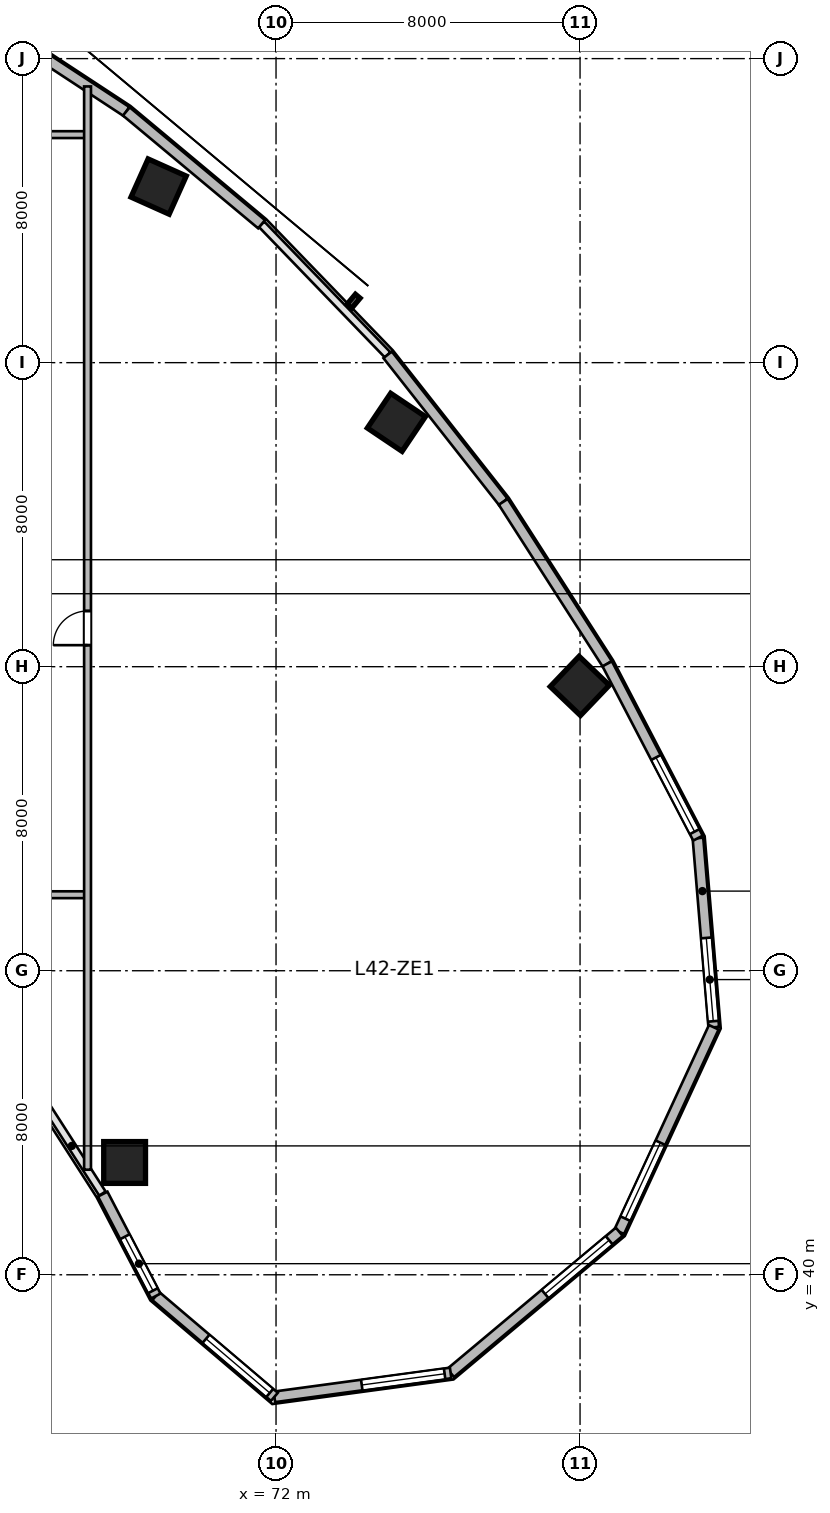
"""IFC4 building model, lengths in metres.
Left out: names, types, materials, properties, quantities, classifications, styles, units other than length and angle.
Written with IfcOpenShell. Run it as: python <this file> out.ifc"""

import sys

from ifc_helpers import new_model, si_unit, direction, frame, frame_2d, origin, origin_2d, place, context, subcontext, project, spatial, rectangle, circle, extrude, source, transform, mapped, element, fill, save


model = new_model("IFC4")
c1 = context("Model", 3, precision=1e-05, world=origin(), true_north=direction((0.0, 1.0)))
c2 = subcontext(c1, "Body", "Model", "MODEL_VIEW")
j1 = project(units=[si_unit("LENGTHUNIT", "METRE"), si_unit("PLANEANGLEUNIT", "RADIAN")], contexts=[c1])
p1 = place(None, origin())
s1 = spatial("IfcSite", under=j1, at=p1, CompositionType="ELEMENT")
p2 = place(p1, origin())
s2 = spatial("IfcBuilding", under=s1, at=p2, CompositionType="ELEMENT")
p3 = place(p2, frame((0.0, 0.0, 174.0)))
s3 = spatial("IfcBuildingStorey", under=s2, at=p3, CompositionType="ELEMENT", Elevation=174.0)
m1 = source(origin(), c2, "Body", "SweptSolid", [
    extrude(rectangle(XDim=1.1, YDim=1.1, at=origin_2d()), origin(), (0.0, 0.0, 1.0), 3.9),
])
for number, where, z_axis, x_axis in (
    (1, (68.91, 68.633, 0.0), (0.0, 0.0, 1.0), (0.409, 0.912, 0.0)),
    (2, (75.167, 62.43, 0.0), (0.0, 0.0, 1.0), (0.558, 0.83, 0.0)),
):
    element("IfcColumn", number, at=place(p3, frame(where, z_axis=z_axis, x_axis=x_axis)), inside=s3, PredefinedType="COLUMN", context=c2, shape_type="MappedRepresentation", body=[
        mapped(m1, transform((0.0, 0.0, 0.0), scale=1.0)),
    ])
m2 = source(origin(), c2, "Body", "SweptSolid", [
    extrude(circle(Radius=0.55, at=origin_2d()), origin(), (0.0, 0.0, 1.0), 3.9),
])
p4 = place(p3, frame((68.015, 42.955, 0.0), z_axis=(0.0, 0.0, 1.0), x_axis=(0.690756218984, 0.723087716626, 0.0)))
e3 = element("IfcColumn", 3, at=p4, inside=s3, PredefinedType="COLUMN", context=c2, shape_type="MappedRepresentation", body=[
    mapped(m2, transform((0.0, 0.0, 0.0), scale=1.0)),
])
p5 = place(p3, frame((79.993, 55.494, 0.0), z_axis=(0.0, 0.0, 1.0), x_axis=(0.690756218984, 0.723087716626, 0.0)))
e4 = element("IfcColumn", 4, at=p5, inside=s3, PredefinedType="COLUMN", context=c2, shape_type="MappedRepresentation", body=[
    mapped(m1, transform((0.0, 0.0, 0.0), scale=1.0)),
])
m3 = source(origin(), c2, "Body", "SweptSolid", [
    extrude(rectangle(XDim=4.994, YDim=0.28, at=frame_2d((2.497, 0.0))), origin(), (0.0, 0.0, 1.0), 3.65),
])
p6 = place(p3, frame((83.102, 51.489, 0.0), z_axis=(0.0, 0.0, 1.0), x_axis=(0.083344839916, -0.996520766296, 0.0)))
e5 = element("IfcWall", 5, at=p6, inside=s3, PredefinedType="SOLIDWALL", context=c2, shape_type="MappedRepresentation", body=[
    mapped(m3, transform((0.0, 0.0, 0.0), scale=1.0)),
])
p7 = place(p6, frame((2.635, 0.0, 0.95)))
e6 = element("IfcOpeningElement", 6, at=p7, cuts=e5, PredefinedType="OPENING", context=c2, shape_type="SweptSolid", body=[
    extrude(rectangle(XDim=2.2, YDim=2.1, at=frame_2d((1.1, 1.05))), frame((0.0, 0.15, 0.0), z_axis=(0.0, -1.0, 0.0), x_axis=(1.0, 0.0, 0.0)), (0.0, 0.0, 1.0), 0.3),
])
m4 = source(origin(), c2, "Body", "SweptSolid", [
    extrude(rectangle(XDim=5.927, YDim=0.28, at=frame_2d((2.964, 0.0))), origin(), (0.0, 0.0, 1.0), 3.65),
])
p8 = place(p3, frame((83.519, 46.512, 0.0), z_axis=(0.0, 0.0, 1.0), x_axis=(-0.419656204795, -0.907683132914, 0.0)))
e7 = element("IfcWall", 7, at=p8, inside=s3, PredefinedType="SOLIDWALL", context=c2, shape_type="MappedRepresentation", body=[
    mapped(m4, transform((0.0, 0.0, 0.0), scale=1.0)),
])
p9 = place(p8, frame((3.346, 0.0, 0.95)))
e8 = element("IfcOpeningElement", 8, at=p9, cuts=e7, PredefinedType="OPENING", context=c2, shape_type="SweptSolid", body=[
    extrude(rectangle(XDim=2.2, YDim=2.1, at=frame_2d((1.1, 1.05))), frame((0.0, 0.15, 0.0), z_axis=(0.0, -1.0, 0.0), x_axis=(1.0, 0.0, 0.0)), (0.0, 0.0, 1.0), 0.3),
])
m5 = source(origin(), c2, "Body", "SweptSolid", [
    extrude(rectangle(XDim=5.786, YDim=0.28, at=frame_2d((2.893, 0.0))), origin(), (0.0, 0.0, 1.0), 3.65),
])
p10 = place(p3, frame((81.031, 41.131, 0.0), z_axis=(0.0, 0.0, 1.0), x_axis=(-0.766711306852, -0.641992034176, 0.0)))
e9 = element("IfcWall", 9, at=p10, inside=s3, PredefinedType="SOLIDWALL", context=c2, shape_type="MappedRepresentation", body=[
    mapped(m5, transform((0.0, 0.0, 0.0), scale=1.0)),
])
p11 = place(p10, frame((0.347, 0.0, 0.95)))
e10 = element("IfcOpeningElement", 10, at=p11, cuts=e9, PredefinedType="OPENING", context=c2, shape_type="SweptSolid", body=[
    extrude(rectangle(XDim=2.2, YDim=2.1, at=frame_2d((1.1, 1.05))), frame((0.0, 0.15, 0.0), z_axis=(0.0, -1.0, 0.0), x_axis=(1.0, 0.0, 0.0)), (0.0, 0.0, 1.0), 0.3),
])
m6 = source(origin(), c2, "Body", "SweptSolid", [
    extrude(rectangle(XDim=4.68, YDim=0.28, at=frame_2d((2.34, 0.0))), origin(), (0.0, 0.0, 1.0), 3.65),
])
p12 = place(p3, frame((76.594, 37.417, 0.0), z_axis=(0.0, 0.0, 1.0), x_axis=(-0.990931146435, -0.134370618162, 0.0)))
e11 = element("IfcWall", 11, at=p12, inside=s3, PredefinedType="SOLIDWALL", context=c2, shape_type="MappedRepresentation", body=[
    mapped(m6, transform((0.0, 0.0, 0.0), scale=1.0)),
])
p13 = place(p12, frame((0.16, 0.0, 0.95)))
e12 = element("IfcOpeningElement", 12, at=p13, cuts=e11, PredefinedType="OPENING", context=c2, shape_type="SweptSolid", body=[
    extrude(rectangle(XDim=2.2, YDim=2.1, at=frame_2d((1.1, 1.05))), frame((0.0, 0.15, 0.0), z_axis=(0.0, -1.0, 0.0), x_axis=(1.0, 0.0, 0.0)), (0.0, 0.0, 1.0), 0.3),
])
m7 = source(origin(), c2, "Body", "SweptSolid", [
    extrude(rectangle(XDim=4.096, YDim=0.28, at=frame_2d((2.048, 0.0))), origin(), (0.0, 0.0, 1.0), 3.65),
])
p14 = place(p3, frame((71.957, 36.788, 0.0), z_axis=(0.0, 0.0, 1.0), x_axis=(-0.761926081737, 0.647663991564, 0.0)))
e13 = element("IfcWall", 13, at=p14, inside=s3, PredefinedType="SOLIDWALL", context=c2, shape_type="MappedRepresentation", body=[
    mapped(m7, transform((0.0, 0.0, 0.0), scale=1.0)),
])
p15 = place(p14, frame((0.16, 0.0, 0.95)))
e14 = element("IfcOpeningElement", 14, at=p15, cuts=e13, PredefinedType="OPENING", context=c2, shape_type="SweptSolid", body=[
    extrude(rectangle(XDim=2.2, YDim=2.1, at=frame_2d((1.1, 1.05))), frame((0.0, 0.15, 0.0), z_axis=(0.0, -1.0, 0.0), x_axis=(1.0, 0.0, 0.0)), (0.0, 0.0, 1.0), 0.3),
])
m8 = source(origin(), c2, "Body", "SweptSolid", [
    extrude(rectangle(XDim=3.024, YDim=0.28, at=frame_2d((1.512, 0.0))), origin(), (0.0, 0.0, 1.0), 3.65),
])
p16 = place(p3, frame((68.836, 39.44, 0.0), z_axis=(0.0, 0.0, 1.0), x_axis=(-0.461718746531, 0.887026380161, 0.0)))
e15 = element("IfcWall", 15, at=p16, inside=s3, PredefinedType="SOLIDWALL", context=c2, shape_type="MappedRepresentation", body=[
    mapped(m8, transform((0.0, 0.0, 0.0), scale=1.0)),
])
p17 = place(p16, frame((0.16, 0.0, 0.95)))
e16 = element("IfcOpeningElement", 16, at=p17, cuts=e15, PredefinedType="OPENING", context=c2, shape_type="SweptSolid", body=[
    extrude(rectangle(XDim=1.6, YDim=1.9, at=frame_2d((0.8, 0.95))), frame((0.0, 0.15, 0.0), z_axis=(0.0, -1.0, 0.0), x_axis=(1.0, 0.0, 0.0)), (0.0, 0.0, 1.0), 0.3),
])
m9 = source(origin(), c2, "Body", "SweptSolid", [
    extrude(rectangle(XDim=4.501, YDim=0.28, at=frame_2d((2.25, 0.0))), origin(), (0.0, 0.0, 1.0), 3.65),
])
p18 = place(p3, frame((64.298, 73.08, 0.0), z_axis=(0.0, 0.0, 1.0), x_axis=(0.835984920737, -0.548752414391, 0.0)))
e17 = element("IfcWall", 17, at=p18, inside=s3, PredefinedType="SOLIDWALL", context=c2, shape_type="MappedRepresentation", body=[
    mapped(m9, transform((0.0, 0.0, 0.0), scale=1.0)),
])
m10 = source(origin(), c2, "Body", "SweptSolid", [
    extrude(rectangle(XDim=4.634, YDim=0.28, at=frame_2d((2.317, 0.0))), origin(), (0.0, 0.0, 1.0), 3.65),
])
p19 = place(p3, frame((68.061, 70.61, 0.0), z_axis=(0.0, 0.0, 1.0), x_axis=(0.767910229096, -0.640557475993, 0.0)))
e18 = element("IfcWall", 18, at=p19, inside=s3, PredefinedType="SOLIDWALL", context=c2, shape_type="MappedRepresentation", body=[
    mapped(m10, transform((0.0, 0.0, 0.0), scale=1.0)),
])
m11 = source(origin(), c2, "Body", "SweptSolid", [
    extrude(rectangle(XDim=4.922, YDim=0.28, at=frame_2d((2.461, 0.0))), origin(), (0.0, 0.0, 1.0), 3.65),
])
p20 = place(p3, frame((74.936, 64.206, 0.0), z_axis=(0.0, 0.0, 1.0), x_axis=(0.61817639101, -0.786039407153, 0.0)))
e19 = element("IfcWall", 19, at=p20, inside=s3, PredefinedType="SOLIDWALL", context=c2, shape_type="MappedRepresentation", body=[
    mapped(m11, transform((0.0, 0.0, 0.0), scale=1.0)),
])
m12 = source(origin(), c2, "Body", "SweptSolid", [
    extrude(rectangle(XDim=5.065, YDim=0.28, at=frame_2d((2.532, 0.0))), origin(), (0.0, 0.0, 1.0), 3.65),
])
p21 = place(p3, frame((77.979, 60.338, 0.0), z_axis=(0.0, 0.0, 1.0), x_axis=(0.540177618806, -0.841551032404, 0.0)))
e20 = element("IfcWall", 20, at=p21, inside=s3, PredefinedType="SOLIDWALL", context=c2, shape_type="MappedRepresentation", body=[
    mapped(m12, transform((0.0, 0.0, 0.0), scale=1.0)),
])
m13 = source(origin(), c2, "Body", "SweptSolid", [
    extrude(rectangle(XDim=5.171, YDim=0.28, at=frame_2d((2.585, 0.0))), origin(), (0.0, 0.0, 1.0), 3.65),
])
p22 = place(p3, frame((80.715, 56.075, 0.0), z_axis=(0.0, 0.0, 1.0), x_axis=(0.461752581363, -0.887008767491, 0.0)))
e21 = element("IfcWall", 21, at=p22, inside=s3, PredefinedType="SOLIDWALL", context=c2, shape_type="MappedRepresentation", body=[
    mapped(m13, transform((0.0, 0.0, 0.0), scale=1.0)),
])
p23 = place(p22, frame((2.778, 0.0, 0.95)))
e22 = element("IfcOpeningElement", 22, at=p23, cuts=e21, PredefinedType="OPENING", context=c2, shape_type="SweptSolid", body=[
    extrude(rectangle(XDim=2.2, YDim=2.1, at=frame_2d((1.1, 1.05))), frame((0.0, 0.15, 0.0), z_axis=(0.0, -1.0, 0.0), x_axis=(1.0, 0.0, 0.0)), (0.0, 0.0, 1.0), 0.3),
])
m14 = source(origin(), c2, "Body", "SweptSolid", [
    extrude(rectangle(XDim=2.5, YDim=0.18, at=frame_2d((1.25, 0.0))), origin(), (0.0, 0.0, 1.0), 3.65),
])
p24 = place(p3, frame((64.5, 50.0, 0.0), z_axis=(0.0, 0.0, 1.0), x_axis=(1.0, 0.0, 0.0)))
e23 = element("IfcWall", 23, at=p24, inside=s3, PredefinedType="PLUMBINGWALL", context=c2, shape_type="MappedRepresentation", body=[
    mapped(m14, transform((0.0, 0.0, 0.0), scale=1.0)),
])
m15 = source(origin(), c2, "Body", "SweptSolid", [
    extrude(rectangle(XDim=2.5, YDim=0.18, at=frame_2d((1.25, 0.0))), origin(), (0.0, 0.0, 1.0), 3.022),
])
p25 = place(p3, frame((64.5, 70.0, 0.0), z_axis=(0.0, 0.0, 1.0), x_axis=(1.0, 0.0, 0.0)))
e24 = element("IfcWall", 24, at=p25, inside=s3, PredefinedType="PLUMBINGWALL", context=c2, shape_type="MappedRepresentation", body=[
    mapped(m15, transform((0.0, 0.0, 0.0), scale=1.0)),
])
m16 = source(origin(), c2, "Body", "SweptSolid", [
    extrude(rectangle(XDim=28.503, YDim=0.18, at=frame_2d((14.251, 0.0))), origin(), (0.0, 0.0, 1.0), 2.942),
])
p26 = place(p3, frame((67.04, 42.765, 0.0), z_axis=(0.0, 0.0, 1.0), x_axis=(0.0, 1.0, 0.0)))
e25 = element("IfcWall", 25, at=p26, inside=s3, PredefinedType="PLUMBINGWALL", context=c2, shape_type="MappedRepresentation", body=[
    mapped(m16, transform((0.0, 0.0, 0.0), scale=1.0)),
])
p27 = place(p26, frame((13.802, 0.0, 0.0)))
e26 = element("IfcOpeningElement", 26, at=p27, cuts=e25, PredefinedType="OPENING", context=c2, shape_type="SweptSolid", body=[
    extrude(rectangle(XDim=0.9, YDim=2.08, at=frame_2d((0.45, 1.04))), frame((0.0, 0.1, 0.0), z_axis=(0.0, -1.0, 0.0), x_axis=(1.0, 0.0, 0.0)), (0.0, 0.0, 1.0), 0.2),
])
m17 = source(origin(), c2, "Body", "SweptSolid", [
    extrude(rectangle(XDim=2.2, YDim=2.1, at=frame_2d((1.1, 1.05))), frame((0.0, 0.03, 0.0), z_axis=(0.0, -1.0, 0.0), x_axis=(1.0, 0.0, 0.0)), (0.0, 0.0, 1.0), 0.06),
])
p28 = place(p7, origin())
e27 = element("IfcWindow", 27, at=p28, inside=s3, PartitioningType="TRIPLE_PANEL_VERTICAL", PredefinedType="WINDOW", context=c2, shape_type="MappedRepresentation", body=[
    mapped(m17, transform((0.0, 0.0, 0.0), scale=1.0)),
])
fill(e6, e27)
p29 = place(p9, origin())
e28 = element("IfcWindow", 28, at=p29, inside=s3, PartitioningType="TRIPLE_PANEL_VERTICAL", PredefinedType="WINDOW", context=c2, shape_type="MappedRepresentation", body=[
    mapped(m17, transform((0.0, 0.0, 0.0), scale=1.0)),
])
fill(e8, e28)
p30 = place(p11, origin())
e29 = element("IfcWindow", 29, at=p30, inside=s3, PartitioningType="TRIPLE_PANEL_VERTICAL", PredefinedType="WINDOW", context=c2, shape_type="MappedRepresentation", body=[
    mapped(m17, transform((0.0, 0.0, 0.0), scale=1.0)),
])
fill(e10, e29)
p31 = place(p13, origin())
e30 = element("IfcWindow", 30, at=p31, inside=s3, PartitioningType="TRIPLE_PANEL_VERTICAL", PredefinedType="WINDOW", context=c2, shape_type="MappedRepresentation", body=[
    mapped(m17, transform((0.0, 0.0, 0.0), scale=1.0)),
])
fill(e12, e30)
p32 = place(p15, origin())
e31 = element("IfcWindow", 31, at=p32, inside=s3, PartitioningType="TRIPLE_PANEL_VERTICAL", PredefinedType="WINDOW", context=c2, shape_type="MappedRepresentation", body=[
    mapped(m17, transform((0.0, 0.0, 0.0), scale=1.0)),
])
fill(e14, e31)
m18 = source(origin(), c2, "Body", "SweptSolid", [
    extrude(rectangle(XDim=1.6, YDim=1.9, at=frame_2d((0.8, 0.95))), frame((0.0, 0.03, 0.0), z_axis=(0.0, -1.0, 0.0), x_axis=(1.0, 0.0, 0.0)), (0.0, 0.0, 1.0), 0.06),
])
p33 = place(p17, origin())
e32 = element("IfcWindow", 32, at=p33, inside=s3, PartitioningType="SINGLE_PANEL", PredefinedType="WINDOW", context=c2, shape_type="MappedRepresentation", body=[
    mapped(m18, transform((0.0, 0.0, 0.0), scale=1.0)),
])
fill(e16, e32)
p34 = place(p23, origin())
e33 = element("IfcWindow", 33, at=p34, inside=s3, PartitioningType="TRIPLE_PANEL_VERTICAL", PredefinedType="WINDOW", context=c2, shape_type="MappedRepresentation", body=[
    mapped(m17, transform((0.0, 0.0, 0.0), scale=1.0)),
])
fill(e22, e33)
m19 = source(origin(), c2, "Body", "SweptSolid", [
    extrude(rectangle(XDim=0.9, YDim=2.08, at=frame_2d((0.45, 1.04))), frame((0.0, 0.025, 0.0), z_axis=(0.0, -1.0, 0.0), x_axis=(1.0, 0.0, 0.0)), (0.0, 0.0, 1.0), 0.05),
])
p35 = place(p27, origin())
e34 = element("IfcDoor", 34, at=p35, inside=s3, OperationType="SINGLE_SWING_LEFT", PredefinedType="DOOR", context=c2, shape_type="MappedRepresentation", body=[
    mapped(m19, transform((0.0, 0.0, 0.0), scale=1.0)),
])
fill(e26, e34)
save(model, sys.argv[1])
